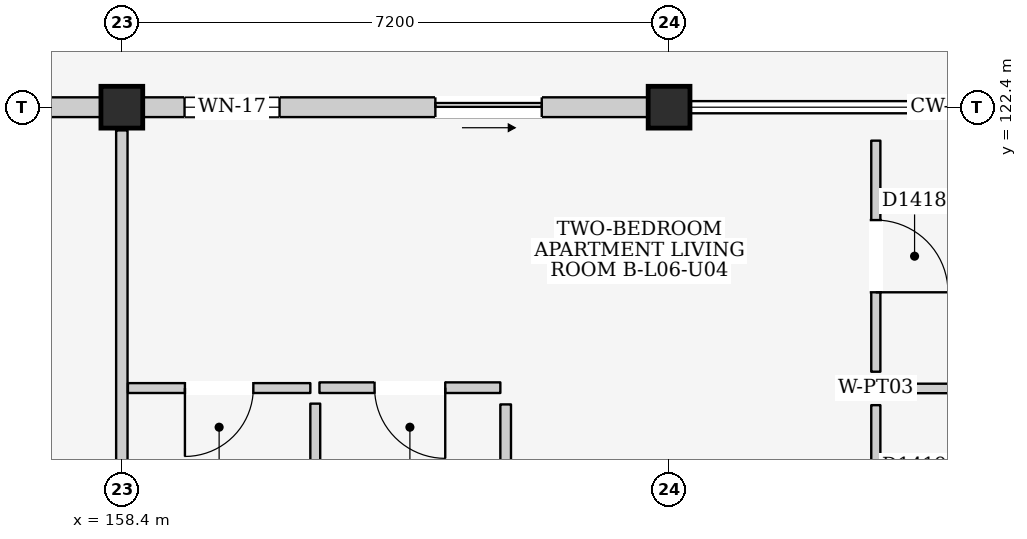
"""IFC4 building model, lengths in metres.
Left out: names, types, materials, properties, quantities, classifications, styles, units other than length and angle.
Written with IfcOpenShell. Run it as: python <this file> out.ifc"""

import sys

from ifc_helpers import new_model, si_unit, direction, frame, frame_2d, origin, origin_2d, place, context, subcontext, project, spatial, rectangle, extrude, element, fill, save


model = new_model("IFC4")
c1 = context("Model", 3, precision=1e-05, world=origin(), true_north=direction((0.0, 1.0)))
c2 = subcontext(c1, "Body", "Model", "MODEL_VIEW")
j1 = project(units=[si_unit("LENGTHUNIT", "METRE"), si_unit("PLANEANGLEUNIT", "RADIAN")], contexts=[c1])
p1 = place(None, origin())
s1 = spatial("IfcSite", under=j1, at=p1, CompositionType="ELEMENT")
p2 = place(p1, origin())
s2 = spatial("IfcBuilding", under=s1, at=p2, CompositionType="ELEMENT")
p3 = place(p2, frame((0.0, 0.0, 21.9)))
s3 = spatial("IfcBuildingStorey", under=s2, at=p3, CompositionType="ELEMENT", Elevation=21.9)
for number, where, z_axis, x_axis in (
    (1, (158.4, 122.4, 0.0), (0.0, 0.0, 1.0), (1.0, 0.0, 0.0)),
    (2, (165.6, 122.4, 0.0), (0.0, 0.0, 1.0), (1.0, 0.0, 0.0)),
):
    element("IfcColumn", number, at=place(p3, frame(where, z_axis=z_axis, x_axis=x_axis)), inside=s3, PredefinedType="COLUMN", context=c2, shape_type="SweptSolid", body=[
        extrude(rectangle(XDim=0.55, YDim=0.55, at=origin_2d()), origin(), (0.0, 0.0, 1.0), 3.2),
    ])
p4 = place(p3, frame((151.475, 122.4, 0.0), z_axis=(0.0, 0.0, 1.0), x_axis=(1.0, 0.0, 0.0)))
e3 = element("IfcWall", 3, at=p4, inside=s3, PredefinedType="ELEMENTEDWALL", context=c2, shape_type="SweptSolid", body=[
    extrude(rectangle(XDim=6.65, YDim=0.26, at=frame_2d((3.325, 0.0))), origin(), (0.0, 0.0, 1.0), 2.515),
])
p5 = place(p4, frame((3.85, 0.0, 0.0)))
e4 = element("IfcOpeningElement", 4, at=p5, cuts=e3, PredefinedType="OPENING", context=c2, shape_type="SweptSolid", body=[
    extrude(rectangle(XDim=2.0, YDim=2.12, at=frame_2d((1.0, 1.06))), frame((0.0, 0.145, 0.0), z_axis=(0.0, -1.0, 0.0), x_axis=(1.0, 0.0, 0.0)), (0.0, 0.0, 1.0), 0.29),
])
p6 = place(p4, frame((0.55, 0.0, 0.9)))
e5 = element("IfcOpeningElement", 5, at=p6, cuts=e3, PredefinedType="OPENING", context=c2, shape_type="SweptSolid", body=[
    extrude(rectangle(XDim=1.45, YDim=1.4, at=frame_2d((0.725, 0.7))), frame((0.0, 0.145, 0.0), z_axis=(0.0, -1.0, 0.0), x_axis=(1.0, 0.0, 0.0)), (0.0, 0.0, 1.0), 0.29),
])
p7 = place(p3, frame((158.675, 122.4, 0.0), z_axis=(0.0, 0.0, 1.0), x_axis=(1.0, 0.0, 0.0)))
e6 = element("IfcWall", 6, at=p7, inside=s3, PredefinedType="ELEMENTEDWALL", context=c2, shape_type="SweptSolid", body=[
    extrude(rectangle(XDim=6.65, YDim=0.26, at=frame_2d((3.325, 0.0))), origin(), (0.0, 0.0, 1.0), 2.515),
])
p8 = place(p7, frame((3.85, 0.0, 0.0)))
e7 = element("IfcOpeningElement", 7, at=p8, cuts=e6, PredefinedType="OPENING", context=c2, shape_type="SweptSolid", body=[
    extrude(rectangle(XDim=1.4, YDim=2.1, at=frame_2d((0.7, 1.05))), frame((0.0, 0.145, 0.0), z_axis=(0.0, -1.0, 0.0), x_axis=(1.0, 0.0, 0.0)), (0.0, 0.0, 1.0), 0.29),
])
p9 = place(p7, frame((0.55, 0.0, 0.9)))
e8 = element("IfcOpeningElement", 8, at=p9, cuts=e6, PredefinedType="OPENING", context=c2, shape_type="SweptSolid", body=[
    extrude(rectangle(XDim=1.25, YDim=1.3, at=frame_2d((0.625, 0.65))), frame((0.0, 0.145, 0.0), z_axis=(0.0, -1.0, 0.0), x_axis=(1.0, 0.0, 0.0)), (0.0, 0.0, 1.0), 0.29),
])
p10 = place(p3, frame((158.4, 115.505, 0.0), z_axis=(0.0, 0.0, 1.0), x_axis=(0.0, 1.0, 0.0)))
e9 = element("IfcWall", 9, at=p10, inside=s3, PredefinedType="PARTITIONING", context=c2, shape_type="SweptSolid", body=[
    extrude(rectangle(XDim=6.59, YDim=0.15, at=frame_2d((3.295, 0.0))), origin(), (0.0, 0.0, 1.0), 2.465),
])
p11 = place(p3, frame((158.48, 118.705, 0.0), z_axis=(0.0, 0.0, 1.0), x_axis=(1.0, 0.0, 0.0)))
e10 = element("IfcWall", 10, at=p11, inside=s3, PredefinedType="PARTITIONING", context=c2, shape_type="SweptSolid", body=[
    extrude(rectangle(XDim=2.4, YDim=0.13, at=frame_2d((1.2, 0.0))), origin(), (0.0, 0.0, 1.0), 2.98),
])
p12 = place(p11, frame((0.75, 0.0, 0.0)))
e11 = element("IfcOpeningElement", 11, at=p12, cuts=e10, PredefinedType="OPENING", context=c2, shape_type="SweptSolid", body=[
    extrude(rectangle(XDim=0.9, YDim=2.1, at=frame_2d((0.45, 1.05))), frame((0.0, 0.08, 0.0), z_axis=(0.0, -1.0, 0.0), x_axis=(1.0, 0.0, 0.0)), (0.0, 0.0, 1.0), 0.16),
])
p13 = place(p3, frame((160.945, 115.46, 0.0), z_axis=(0.0, 0.0, 1.0), x_axis=(0.0, 1.0, 0.0)))
e12 = element("IfcWall", 12, at=p13, inside=s3, PredefinedType="PARTITIONING", context=c2, shape_type="SweptSolid", body=[
    extrude(rectangle(XDim=3.04, YDim=0.13, at=frame_2d((1.52, 0.0))), origin(), (0.0, 0.0, 1.0), 2.98),
])
p14 = place(p3, frame((161.0, 118.71, 0.0), z_axis=(0.0, 0.0, 1.0), x_axis=(1.0, 0.0, 0.0)))
e13 = element("IfcWall", 13, at=p14, inside=s3, PredefinedType="PARTITIONING", context=c2, shape_type="SweptSolid", body=[
    extrude(rectangle(XDim=2.38, YDim=0.14, at=frame_2d((1.19, 0.0))), origin(), (0.0, 0.0, 1.0), 2.98),
])
p15 = place(p14, frame((0.725, 0.0, 0.0)))
e14 = element("IfcOpeningElement", 14, at=p15, cuts=e13, PredefinedType="OPENING", context=c2, shape_type="SweptSolid", body=[
    extrude(rectangle(XDim=0.93, YDim=2.14, at=frame_2d((0.465, 1.07))), frame((0.0, 0.085, 0.0), z_axis=(0.0, -1.0, 0.0), x_axis=(1.0, 0.0, 0.0)), (0.0, 0.0, 1.0), 0.17),
])
p16 = place(p3, frame((163.45, 115.43, 0.0), z_axis=(0.0, 0.0, 1.0), x_axis=(0.0, 1.0, 0.0)))
e15 = element("IfcWall", 15, at=p16, inside=s3, PredefinedType="PARTITIONING", context=c2, shape_type="SweptSolid", body=[
    extrude(rectangle(XDim=3.06, YDim=0.14, at=frame_2d((1.53, 0.0))), origin(), (0.0, 0.0, 1.0), 2.98),
])
p17 = place(p3, frame((168.32, 118.92, 0.0), z_axis=(0.0, 0.0, 1.0), x_axis=(0.0, 1.0, 0.0)))
e16 = element("IfcWall", 16, at=p17, inside=s3, PredefinedType="PARTITIONING", context=c2, shape_type="SweptSolid", body=[
    extrude(rectangle(XDim=3.04, YDim=0.12, at=frame_2d((1.52, 0.0))), origin(), (0.0, 0.0, 1.0), 2.98),
])
p18 = place(p17, frame((1.045, 0.0, 0.0)))
e17 = element("IfcOpeningElement", 17, at=p18, cuts=e16, PredefinedType="OPENING", context=c2, shape_type="SweptSolid", body=[
    extrude(rectangle(XDim=0.95, YDim=2.15, at=frame_2d((0.475, 1.075))), frame((0.0, 0.075, 0.0), z_axis=(0.0, -1.0, 0.0), x_axis=(1.0, 0.0, 0.0)), (0.0, 0.0, 1.0), 0.15),
])
p19 = place(p3, frame((168.52, 118.7, 0.0), z_axis=(0.0, 0.0, 1.0), x_axis=(1.0, 0.0, 0.0)))
e18 = element("IfcWall", 18, at=p19, inside=s3, PredefinedType="PARTITIONING", context=c2, shape_type="SweptSolid", body=[
    extrude(rectangle(XDim=4.06, YDim=0.125, at=frame_2d((2.03, 0.0))), origin(), (0.0, 0.0, 1.0), 2.98),
])
p20 = place(p3, frame((168.32, 115.44, 0.0), z_axis=(0.0, 0.0, 1.0), x_axis=(0.0, 1.0, 0.0)))
e19 = element("IfcWall", 19, at=p20, inside=s3, PredefinedType="PARTITIONING", context=c2, shape_type="SweptSolid", body=[
    extrude(rectangle(XDim=3.04, YDim=0.12, at=frame_2d((1.52, 0.0))), origin(), (0.0, 0.0, 1.0), 2.98),
])
p21 = place(p20, frame((1.04, 0.0, 0.0)))
e20 = element("IfcOpeningElement", 20, at=p21, cuts=e19, PredefinedType="OPENING", context=c2, shape_type="SweptSolid", body=[
    extrude(rectangle(XDim=0.96, YDim=2.15, at=frame_2d((0.48, 1.075))), frame((0.0, 0.075, 0.0), z_axis=(0.0, -1.0, 0.0), x_axis=(1.0, 0.0, 0.0)), (0.0, 0.0, 1.0), 0.15),
])
p22 = place(p8, frame((1.4, 0.0, 0.0), z_axis=(0.0, 0.0, 1.0), x_axis=(-1.0, 0.0, 0.0)))
e21 = element("IfcDoor", 21, at=p22, inside=s3, OperationType="SLIDING_TO_RIGHT", PredefinedType="DOOR", context=c2, shape_type="SweptSolid", body=[
    extrude(rectangle(XDim=1.4, YDim=2.1, at=frame_2d((0.7, 1.05))), frame((0.0, 0.025, 0.0), z_axis=(0.0, -1.0, 0.0), x_axis=(1.0, 0.0, 0.0)), (0.0, 0.0, 1.0), 0.05),
])
fill(e7, e21)
p23 = place(p9, origin())
e22 = element("IfcWindow", 22, at=p23, inside=s3, PartitioningType="SINGLE_PANEL", PredefinedType="WINDOW", context=c2, shape_type="SweptSolid", body=[
    extrude(rectangle(XDim=1.25, YDim=1.3, at=frame_2d((0.625, 0.65))), frame((0.0, 0.03, 0.0), z_axis=(0.0, -1.0, 0.0), x_axis=(1.0, 0.0, 0.0)), (0.0, 0.0, 1.0), 0.06),
])
fill(e8, e22)
p24 = place(p12, frame((0.9, 0.0, 0.0), z_axis=(0.0, 0.0, 1.0), x_axis=(-1.0, 0.0, 0.0)))
e23 = element("IfcDoor", 23, at=p24, inside=s3, OperationType="SINGLE_SWING_RIGHT", PredefinedType="DOOR", context=c2, shape_type="SweptSolid", body=[
    extrude(rectangle(XDim=0.9, YDim=2.1, at=frame_2d((0.45, 1.05))), frame((0.0, 0.025, 0.0), z_axis=(0.0, -1.0, 0.0), x_axis=(1.0, 0.0, 0.0)), (0.0, 0.0, 1.0), 0.05),
])
fill(e11, e23)
p25 = place(p15, frame((0.93, 0.0, 0.0), z_axis=(0.0, 0.0, 1.0), x_axis=(-1.0, 0.0, 0.0)))
e24 = element("IfcDoor", 24, at=p25, inside=s3, OperationType="SINGLE_SWING_LEFT", PredefinedType="DOOR", context=c2, shape_type="SweptSolid", body=[
    extrude(rectangle(XDim=0.93, YDim=2.14, at=frame_2d((0.465, 1.07))), frame((0.0, 0.025, 0.0), z_axis=(0.0, -1.0, 0.0), x_axis=(1.0, 0.0, 0.0)), (0.0, 0.0, 1.0), 0.05),
])
fill(e14, e24)
p26 = place(p18, frame((0.95, 0.0, 0.0), z_axis=(0.0, 0.0, 1.0), x_axis=(-1.0, 0.0, 0.0)))
e25 = element("IfcDoor", 25, at=p26, inside=s3, OperationType="SINGLE_SWING_RIGHT", PredefinedType="DOOR", context=c2, shape_type="SweptSolid", body=[
    extrude(rectangle(XDim=0.95, YDim=2.15, at=frame_2d((0.475, 1.075))), frame((0.0, 0.025, 0.0), z_axis=(0.0, -1.0, 0.0), x_axis=(1.0, 0.0, 0.0)), (0.0, 0.0, 1.0), 0.05),
])
fill(e17, e25)
save(model, sys.argv[1])
